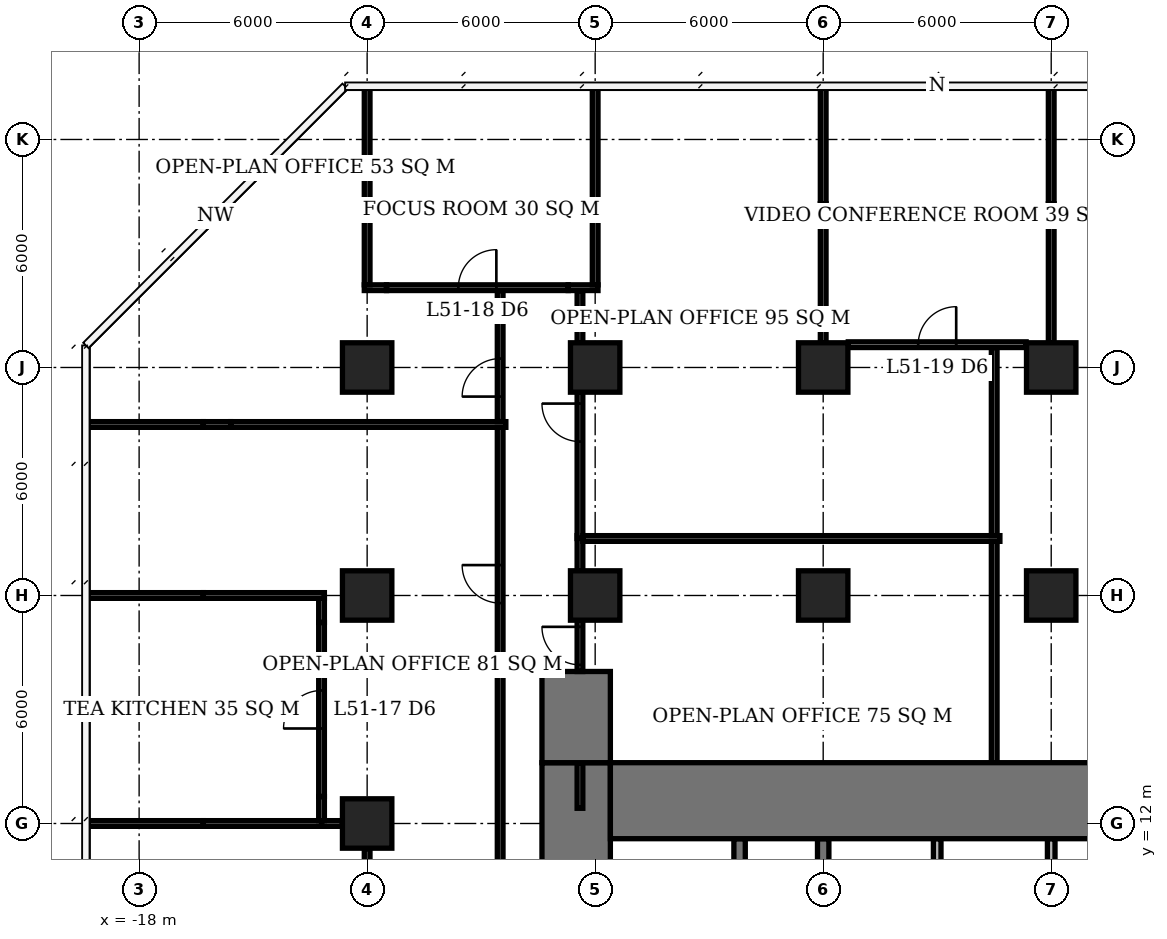
"""IFC4 building model, lengths in metres.
Left out: names, types, materials, properties, quantities, classifications, styles, units other than length and angle.
Written with IfcOpenShell. Run it as: python <this file> out.ifc"""

import sys

from ifc_helpers import new_model, si_unit, direction, frame, frame_2d, origin, origin_2d, place, context, subcontext, project, spatial, rectangle, extrude, element, fill, save


model = new_model("IFC4")
c1 = context("Model", 3, precision=1e-05, world=origin(), true_north=direction((0.0, 1.0)))
c2 = subcontext(c1, "Body", "Model", "MODEL_VIEW")
j1 = project(units=[si_unit("LENGTHUNIT", "METRE"), si_unit("PLANEANGLEUNIT", "RADIAN")], contexts=[c1])
p1 = place(None, origin())
s1 = spatial("IfcSite", under=j1, at=p1, CompositionType="ELEMENT")
p2 = place(p1, origin())
s2 = spatial("IfcBuilding", under=s1, at=p2, CompositionType="ELEMENT")
p3 = place(p2, frame((0.0, 0.0, 208.4)))
s3 = spatial("IfcBuildingStorey", under=s2, at=p3, CompositionType="ELEMENT", Elevation=208.4)
for number, where, z_axis, x_axis in (
    (1, (-12.0, 12.0, 0.0), (0.0, 0.0, 1.0), (1.0, 0.0, 0.0)),
    (2, (-12.0, 18.0, 0.0), (0.0, 0.0, 1.0), (1.0, 0.0, 0.0)),
    (3, (-12.0, 24.0, 0.0), (0.0, 0.0, 1.0), (1.0, 0.0, 0.0)),
    (4, (-6.0, 18.0, 0.0), (0.0, 0.0, 1.0), (1.0, 0.0, 0.0)),
    (5, (-6.0, 24.0, 0.0), (0.0, 0.0, 1.0), (1.0, 0.0, 0.0)),
    (6, (0.0, 18.0, 0.0), (0.0, 0.0, 1.0), (1.0, 0.0, 0.0)),
    (7, (0.0, 24.0, 0.0), (0.0, 0.0, 1.0), (1.0, 0.0, 0.0)),
    (8, (6.0, 18.0, 0.0), (0.0, 0.0, 1.0), (1.0, 0.0, 0.0)),
    (9, (6.0, 24.0, 0.0), (0.0, 0.0, 1.0), (1.0, 0.0, 0.0)),
):
    element("IfcColumn", number, at=place(p3, frame(where, z_axis=z_axis, x_axis=x_axis)), inside=s3, PredefinedType="COLUMN", context=c2, shape_type="SweptSolid", body=[
        extrude(rectangle(XDim=1.3, YDim=1.3, at=origin_2d()), origin(), (0.0, 0.0, 1.0), 3.9),
    ])
p4 = place(p3, frame((-5.6, 12.6, 0.0), z_axis=(0.0, 0.0, 1.0), x_axis=(1.0, 0.0, 0.0)))
e10 = element("IfcWall", 10, at=p4, inside=s3, PredefinedType="SHEAR", context=c2, shape_type="SweptSolid", body=[
    extrude(rectangle(XDim=23.2, YDim=2.0, at=frame_2d((11.6, 0.0))), origin(), (0.0, 0.0, 1.0), 3.9),
])
p5 = place(p3, frame((-6.5, -7.6, 0.0), z_axis=(0.0, 0.0, 1.0), x_axis=(0.0, 1.0, 0.0)))
e11 = element("IfcWall", 11, at=p5, inside=s3, PredefinedType="SHEAR", context=c2, shape_type="SweptSolid", body=[
    extrude(rectangle(XDim=21.2, YDim=1.8, at=frame_2d((10.6, 0.0))), origin(), (0.0, 0.0, 1.0), 3.9),
])
p6 = place(p5, frame((7.8, 0.0, 0.0)))
e12 = element("IfcOpeningElement", 12, at=p6, cuts=e11, PredefinedType="OPENING", context=c2, shape_type="SweptSolid", body=[
    extrude(rectangle(XDim=1.8, YDim=2.4, at=frame_2d((0.9, 1.2))), frame((0.0, 0.91, 0.0), z_axis=(0.0, -1.0, 0.0), x_axis=(1.0, 0.0, 0.0)), (0.0, 0.0, 1.0), 1.82),
])
p7 = place(p3, frame((-6.5, 13.6, 0.0), z_axis=(0.0, 0.0, 1.0), x_axis=(0.0, 1.0, 0.0)))
e13 = element("IfcWall", 13, at=p7, inside=s3, PredefinedType="SHEAR", context=c2, shape_type="SweptSolid", body=[
    extrude(rectangle(XDim=2.4, YDim=1.8, at=frame_2d((1.2, 0.0))), origin(), (0.0, 0.0, 1.0), 3.9),
])
for number, where, z_axis, x_axis in (
    (14, (0.0, 3.15, 0.0), (0.0, 0.0, 1.0), (0.0, 1.0, 0.0)),
    (15, (-2.2, 3.15, 0.0), (0.0, 0.0, 1.0), (0.0, 1.0, 0.0)),
):
    element("IfcWall", number, at=place(p3, frame(where, z_axis=z_axis, x_axis=x_axis)), inside=s3, PredefinedType="SHEAR", context=c2, shape_type="SweptSolid", body=[
        extrude(rectangle(XDim=8.45, YDim=0.3, at=frame_2d((4.225, 0.0))), origin(), (0.0, 0.0, 1.0), 3.9),
    ])
for number, where, z_axis, x_axis in (
    (16, (3.0, 6.15, 0.0), (0.0, 0.0, 1.0), (0.0, 1.0, 0.0)),
    (17, (6.0, 6.15, 0.0), (0.0, 0.0, 1.0), (0.0, 1.0, 0.0)),
):
    element("IfcWall", number, at=place(p3, frame(where, z_axis=z_axis, x_axis=x_axis)), inside=s3, PredefinedType="SOLIDWALL", context=c2, shape_type="SweptSolid", body=[
        extrude(rectangle(XDim=5.45, YDim=0.2, at=frame_2d((2.725, 0.0))), origin(), (0.0, 0.0, 1.0), 3.9),
    ])
p8 = place(p3, frame((-19.35, 12.0, 0.0), z_axis=(0.0, 0.0, 1.0), x_axis=(1.0, 0.0, 0.0)))
e18 = element("IfcWall", 18, at=p8, inside=s3, PredefinedType="PARTITIONING", context=c2, shape_type="SweptSolid", body=[
    extrude(rectangle(XDim=3.04, YDim=0.15, at=frame_2d((1.52, 0.0))), origin(), (0.0, 0.0, 1.0), 3.65),
])
p9 = place(p3, frame((-16.31, 12.0, 0.0), z_axis=(0.0, 0.0, 1.0), x_axis=(1.0, 0.0, 0.0)))
e19 = element("IfcWall", 19, at=p9, inside=s3, PredefinedType="PARTITIONING", context=c2, shape_type="SweptSolid", body=[
    extrude(rectangle(XDim=3.185, YDim=0.15, at=frame_2d((1.593, 0.0))), origin(), (0.0, 0.0, 1.0), 2.65),
])
p10 = place(p3, frame((-13.2, 12.0, 0.0), z_axis=(0.0, 0.0, 1.0), x_axis=(1.0, 0.0, 0.0)))
e20 = element("IfcWall", 20, at=p10, inside=s3, PredefinedType="PARTITIONING", context=c2, shape_type="SweptSolid", body=[
    extrude(rectangle(XDim=0.55, YDim=0.15, at=frame_2d((0.275, 0.0))), origin(), (0.0, 0.0, 1.0), 2.65),
])
p11 = place(p3, frame((-19.4, 18.0, 0.0), z_axis=(0.0, 0.0, 1.0), x_axis=(1.0, 0.0, 0.0)))
e21 = element("IfcWall", 21, at=p11, inside=s3, PredefinedType="PARTITIONING", context=c2, shape_type="SweptSolid", body=[
    extrude(rectangle(XDim=3.09, YDim=0.15, at=frame_2d((1.545, 0.0))), origin(), (0.0, 0.0, 1.0), 3.65),
])
p12 = place(p3, frame((-16.31, 18.0, 0.0), z_axis=(0.0, 0.0, 1.0), x_axis=(1.0, 0.0, 0.0)))
e22 = element("IfcWall", 22, at=p12, inside=s3, PredefinedType="PARTITIONING", context=c2, shape_type="SweptSolid", body=[
    extrude(rectangle(XDim=3.185, YDim=0.15, at=frame_2d((1.593, 0.0))), origin(), (0.0, 0.0, 1.0), 2.65),
])
p13 = place(p3, frame((0.66, 24.6, 0.0), z_axis=(0.0, 0.0, 1.0), x_axis=(1.0, 0.0, 0.0)))
e23 = element("IfcWall", 23, at=p13, inside=s3, PredefinedType="PARTITIONING", context=c2, shape_type="SweptSolid", body=[
    extrude(rectangle(XDim=4.68, YDim=0.15, at=frame_2d((2.34, 0.0))), origin(), (0.0, 0.0, 1.0), 3.65),
])
p14 = place(p13, frame((1.84, 0.0, 0.0)))
e24 = element("IfcOpeningElement", 24, at=p14, cuts=e23, PredefinedType="OPENING", context=c2, shape_type="SweptSolid", body=[
    extrude(rectangle(XDim=1.0, YDim=2.1, at=frame_2d((0.5, 1.05))), frame((0.0, 0.085, 0.0), z_axis=(0.0, -1.0, 0.0), x_axis=(1.0, 0.0, 0.0)), (0.0, 0.0, 1.0), 0.17),
])
p15 = place(p3, frame((-12.075, 26.1, 0.0), z_axis=(0.0, 0.0, 1.0), x_axis=(1.0, 0.0, 0.0)))
e25 = element("IfcWall", 25, at=p15, inside=s3, PredefinedType="PARTITIONING", context=c2, shape_type="SweptSolid", body=[
    extrude(rectangle(XDim=0.585, YDim=0.15, at=frame_2d((0.292, 0.0))), origin(), (0.0, 0.0, 1.0), 2.65),
])
p16 = place(p3, frame((-11.49, 26.1, 0.0), z_axis=(0.0, 0.0, 1.0), x_axis=(1.0, 0.0, 0.0)))
e26 = element("IfcWall", 26, at=p16, inside=s3, PredefinedType="PARTITIONING", context=c2, shape_type="SweptSolid", body=[
    extrude(rectangle(XDim=4.78, YDim=0.15, at=frame_2d((2.39, 0.0))), origin(), (0.0, 0.0, 1.0), 3.65),
])
p17 = place(p16, frame((1.89, 0.0, 0.0)))
e27 = element("IfcOpeningElement", 27, at=p17, cuts=e26, PredefinedType="OPENING", context=c2, shape_type="SweptSolid", body=[
    extrude(rectangle(XDim=1.0, YDim=2.1, at=frame_2d((0.5, 1.05))), frame((0.0, 0.085, 0.0), z_axis=(0.0, -1.0, 0.0), x_axis=(1.0, 0.0, 0.0)), (0.0, 0.0, 1.0), 0.17),
])
p18 = place(p3, frame((-6.71, 26.1, 0.0), z_axis=(0.0, 0.0, 1.0), x_axis=(1.0, 0.0, 0.0)))
e28 = element("IfcWall", 28, at=p18, inside=s3, PredefinedType="PARTITIONING", context=c2, shape_type="SweptSolid", body=[
    extrude(rectangle(XDim=0.785, YDim=0.15, at=frame_2d((0.393, 0.0))), origin(), (0.0, 0.0, 1.0), 2.65),
])
p19 = place(p3, frame((-13.2, 12.075, 0.0), z_axis=(0.0, 0.0, 1.0), x_axis=(0.0, 1.0, 0.0)))
e29 = element("IfcWall", 29, at=p19, inside=s3, PredefinedType="PARTITIONING", context=c2, shape_type="SweptSolid", body=[
    extrude(rectangle(XDim=0.635, YDim=0.15, at=frame_2d((0.317, 0.0))), origin(), (0.0, 0.0, 1.0), 2.65),
])
p20 = place(p3, frame((-13.2, 12.71, 0.0), z_axis=(0.0, 0.0, 1.0), x_axis=(0.0, 1.0, 0.0)))
e30 = element("IfcWall", 30, at=p20, inside=s3, PredefinedType="PARTITIONING", context=c2, shape_type="SweptSolid", body=[
    extrude(rectangle(XDim=4.58, YDim=0.15, at=frame_2d((2.29, 0.0))), origin(), (0.0, 0.0, 1.0), 3.65),
])
p21 = place(p20, frame((1.79, 0.0, 0.0)))
e31 = element("IfcOpeningElement", 31, at=p21, cuts=e30, PredefinedType="OPENING", context=c2, shape_type="SweptSolid", body=[
    extrude(rectangle(XDim=1.0, YDim=2.1, at=frame_2d((0.5, 1.05))), frame((0.0, 0.085, 0.0), z_axis=(0.0, -1.0, 0.0), x_axis=(1.0, 0.0, 0.0)), (0.0, 0.0, 1.0), 0.17),
])
p22 = place(p3, frame((-13.2, 17.29, 0.0), z_axis=(0.0, 0.0, 1.0), x_axis=(0.0, 1.0, 0.0)))
e32 = element("IfcWall", 32, at=p22, inside=s3, PredefinedType="PARTITIONING", context=c2, shape_type="SweptSolid", body=[
    extrude(rectangle(XDim=0.635, YDim=0.15, at=frame_2d((0.317, 0.0))), origin(), (0.0, 0.0, 1.0), 2.65),
])
p23 = place(p3, frame((-12.0, 9.075, 0.0), z_axis=(0.0, 0.0, 1.0), x_axis=(0.0, 1.0, 0.0)))
e33 = element("IfcWall", 33, at=p23, inside=s3, PredefinedType="PARTITIONING", context=c2, shape_type="SweptSolid", body=[
    extrude(rectangle(XDim=2.265, YDim=0.15, at=frame_2d((1.133, 0.0))), origin(), (0.0, 0.0, 1.0), 3.65),
])
p24 = place(p23, frame((0.325, 0.0, 0.0)))
e34 = element("IfcOpeningElement", 34, at=p24, cuts=e33, PredefinedType="OPENING", context=c2, shape_type="SweptSolid", body=[
    extrude(rectangle(XDim=1.0, YDim=2.1, at=frame_2d((0.5, 1.05))), frame((0.0, 0.085, 0.0), z_axis=(0.0, -1.0, 0.0), x_axis=(1.0, 0.0, 0.0)), (0.0, 0.0, 1.0), 0.17),
])
p25 = place(p3, frame((-12.0, 26.175, 0.0), z_axis=(0.0, 0.0, 1.0), x_axis=(0.0, 1.0, 0.0)))
e35 = element("IfcWall", 35, at=p25, inside=s3, PredefinedType="PARTITIONING", context=c2, shape_type="SweptSolid", body=[
    extrude(rectangle(XDim=2.135, YDim=0.15, at=frame_2d((1.067, 0.0))), origin(), (0.0, 0.0, 1.0), 2.65),
])
p26 = place(p3, frame((-12.0, 28.31, 0.0), z_axis=(0.0, 0.0, 1.0), x_axis=(0.0, 1.0, 0.0)))
e36 = element("IfcWall", 36, at=p26, inside=s3, PredefinedType="PARTITIONING", context=c2, shape_type="SweptSolid", body=[
    extrude(rectangle(XDim=3.09, YDim=0.15, at=frame_2d((1.545, 0.0))), origin(), (0.0, 0.0, 1.0), 3.65),
])
p27 = place(p3, frame((-6.0, 26.175, 0.0), z_axis=(0.0, 0.0, 1.0), x_axis=(0.0, 1.0, 0.0)))
e37 = element("IfcWall", 37, at=p27, inside=s3, PredefinedType="PARTITIONING", context=c2, shape_type="SweptSolid", body=[
    extrude(rectangle(XDim=2.135, YDim=0.15, at=frame_2d((1.067, 0.0))), origin(), (0.0, 0.0, 1.0), 2.65),
])
p28 = place(p3, frame((-6.0, 28.31, 0.0), z_axis=(0.0, 0.0, 1.0), x_axis=(0.0, 1.0, 0.0)))
e38 = element("IfcWall", 38, at=p28, inside=s3, PredefinedType="PARTITIONING", context=c2, shape_type="SweptSolid", body=[
    extrude(rectangle(XDim=3.09, YDim=0.15, at=frame_2d((1.545, 0.0))), origin(), (0.0, 0.0, 1.0), 3.65),
])
p29 = place(p3, frame((0.0, 24.65, 0.0), z_axis=(0.0, 0.0, 1.0), x_axis=(0.0, 1.0, 0.0)))
e39 = element("IfcWall", 39, at=p29, inside=s3, PredefinedType="PARTITIONING", context=c2, shape_type="SweptSolid", body=[
    extrude(rectangle(XDim=3.66, YDim=0.15, at=frame_2d((1.83, 0.0))), origin(), (0.0, 0.0, 1.0), 2.65),
])
p30 = place(p3, frame((0.0, 28.31, 0.0), z_axis=(0.0, 0.0, 1.0), x_axis=(0.0, 1.0, 0.0)))
e40 = element("IfcWall", 40, at=p30, inside=s3, PredefinedType="PARTITIONING", context=c2, shape_type="SweptSolid", body=[
    extrude(rectangle(XDim=3.04, YDim=0.15, at=frame_2d((1.52, 0.0))), origin(), (0.0, 0.0, 1.0), 3.65),
])
p31 = place(p3, frame((6.0, 24.65, 0.0), z_axis=(0.0, 0.0, 1.0), x_axis=(0.0, 1.0, 0.0)))
e41 = element("IfcWall", 41, at=p31, inside=s3, PredefinedType="PARTITIONING", context=c2, shape_type="SweptSolid", body=[
    extrude(rectangle(XDim=3.66, YDim=0.15, at=frame_2d((1.83, 0.0))), origin(), (0.0, 0.0, 1.0), 2.65),
])
p32 = place(p3, frame((6.0, 28.31, 0.0), z_axis=(0.0, 0.0, 1.0), x_axis=(0.0, 1.0, 0.0)))
e42 = element("IfcWall", 42, at=p32, inside=s3, PredefinedType="PARTITIONING", context=c2, shape_type="SweptSolid", body=[
    extrude(rectangle(XDim=3.04, YDim=0.15, at=frame_2d((1.52, 0.0))), origin(), (0.0, 0.0, 1.0), 3.65),
])
p33 = place(p3, frame((-19.4, 22.5, 0.0), z_axis=(0.0, 0.0, 1.0), x_axis=(1.0, 0.0, 0.0)))
e43 = element("IfcWall", 43, at=p33, inside=s3, PredefinedType="PARTITIONING", context=c2, shape_type="SweptSolid", body=[
    extrude(rectangle(XDim=3.09, YDim=0.15, at=frame_2d((1.545, 0.0))), origin(), (0.0, 0.0, 1.0), 3.65),
])
p34 = place(p3, frame((-16.31, 22.5, 0.0), z_axis=(0.0, 0.0, 1.0), x_axis=(1.0, 0.0, 0.0)))
e44 = element("IfcWall", 44, at=p34, inside=s3, PredefinedType="PARTITIONING", context=c2, shape_type="SweptSolid", body=[
    extrude(rectangle(XDim=0.72, YDim=0.15, at=frame_2d((0.36, 0.0))), origin(), (0.0, 0.0, 1.0), 2.65),
])
p35 = place(p3, frame((-15.59, 22.5, 0.0), z_axis=(0.0, 0.0, 1.0), x_axis=(1.0, 0.0, 0.0)))
e45 = element("IfcWall", 45, at=p35, inside=s3, PredefinedType="PARTITIONING", context=c2, shape_type="SweptSolid", body=[
    extrude(rectangle(XDim=7.24, YDim=0.15, at=frame_2d((3.62, 0.0))), origin(), (0.0, 0.0, 1.0), 3.65),
])
p36 = place(p3, frame((-8.5, 10.575, 0.0), z_axis=(0.0, 0.0, 1.0), x_axis=(0.0, 1.0, 0.0)))
e46 = element("IfcWall", 46, at=p36, inside=s3, PredefinedType="PARTITIONING", context=c2, shape_type="SweptSolid", body=[
    extrude(rectangle(XDim=11.85, YDim=0.15, at=frame_2d((5.925, 0.0))), origin(), (0.0, 0.0, 1.0), 3.65),
])
p37 = place(p36, frame((7.225, 0.0, 0.0)))
e47 = element("IfcOpeningElement", 47, at=p37, cuts=e46, PredefinedType="OPENING", context=c2, shape_type="SweptSolid", body=[
    extrude(rectangle(XDim=1.0, YDim=2.1, at=frame_2d((0.5, 1.05))), frame((0.0, 0.085, 0.0), z_axis=(0.0, -1.0, 0.0), x_axis=(1.0, 0.0, 0.0)), (0.0, 0.0, 1.0), 0.17),
])
p38 = place(p3, frame((-8.5, 22.575, 0.0), z_axis=(0.0, 0.0, 1.0), x_axis=(0.0, 1.0, 0.0)))
e48 = element("IfcWall", 48, at=p38, inside=s3, PredefinedType="PARTITIONING", context=c2, shape_type="SweptSolid", body=[
    extrude(rectangle(XDim=3.45, YDim=0.15, at=frame_2d((1.725, 0.0))), origin(), (0.0, 0.0, 1.0), 3.65),
])
p39 = place(p38, frame((0.659, 0.0, 0.0)))
e49 = element("IfcOpeningElement", 49, at=p39, cuts=e48, PredefinedType="OPENING", context=c2, shape_type="SweptSolid", body=[
    extrude(rectangle(XDim=1.0, YDim=2.1, at=frame_2d((0.5, 1.05))), frame((0.0, 0.085, 0.0), z_axis=(0.0, -1.0, 0.0), x_axis=(1.0, 0.0, 0.0)), (0.0, 0.0, 1.0), 0.17),
])
p40 = place(p3, frame((-6.4, 12.4, 0.0), z_axis=(0.0, 0.0, 1.0), x_axis=(0.0, 1.0, 0.0)))
e50 = element("IfcWall", 50, at=p40, inside=s3, PredefinedType="PARTITIONING", context=c2, shape_type="SweptSolid", body=[
    extrude(rectangle(XDim=1.2, YDim=0.15, at=frame_2d((0.6, 0.0))), origin(), (0.0, 0.0, 1.0), 3.65),
])
p41 = place(p3, frame((-6.4, 16.0, 0.0), z_axis=(0.0, 0.0, 1.0), x_axis=(0.0, 1.0, 0.0)))
e51 = element("IfcWall", 51, at=p41, inside=s3, PredefinedType="PARTITIONING", context=c2, shape_type="SweptSolid", body=[
    extrude(rectangle(XDim=1.35, YDim=0.15, at=frame_2d((0.675, 0.0))), origin(), (0.0, 0.0, 1.0), 3.65),
])
p42 = place(p41, frame((0.175, 0.0, 0.0)))
e52 = element("IfcOpeningElement", 52, at=p42, cuts=e51, PredefinedType="OPENING", context=c2, shape_type="SweptSolid", body=[
    extrude(rectangle(XDim=1.0, YDim=2.1, at=frame_2d((0.5, 1.05))), frame((0.0, 0.085, 0.0), z_axis=(0.0, -1.0, 0.0), x_axis=(1.0, 0.0, 0.0)), (0.0, 0.0, 1.0), 0.17),
])
p43 = place(p3, frame((-6.4, 18.65, 0.0), z_axis=(0.0, 0.0, 1.0), x_axis=(0.0, 1.0, 0.0)))
e53 = element("IfcWall", 53, at=p43, inside=s3, PredefinedType="PARTITIONING", context=c2, shape_type="SweptSolid", body=[
    extrude(rectangle(XDim=0.925, YDim=0.15, at=frame_2d((0.462, 0.0))), origin(), (0.0, 0.0, 1.0), 3.65),
])
p44 = place(p3, frame((-6.4, 19.5, 0.0), z_axis=(0.0, 0.0, 1.0), x_axis=(0.0, 1.0, 0.0)))
e54 = element("IfcWall", 54, at=p44, inside=s3, PredefinedType="PARTITIONING", context=c2, shape_type="SweptSolid", body=[
    extrude(rectangle(XDim=3.85, YDim=0.15, at=frame_2d((1.925, 0.0))), origin(), (0.0, 0.0, 1.0), 3.65),
])
p45 = place(p44, frame((2.55, 0.0, 0.0)))
e55 = element("IfcOpeningElement", 55, at=p45, cuts=e54, PredefinedType="OPENING", context=c2, shape_type="SweptSolid", body=[
    extrude(rectangle(XDim=1.0, YDim=2.1, at=frame_2d((0.5, 1.05))), frame((0.0, 0.085, 0.0), z_axis=(0.0, -1.0, 0.0), x_axis=(1.0, 0.0, 0.0)), (0.0, 0.0, 1.0), 0.17),
])
p46 = place(p3, frame((-6.4, 24.65, 0.0), z_axis=(0.0, 0.0, 1.0), x_axis=(0.0, 1.0, 0.0)))
e56 = element("IfcWall", 56, at=p46, inside=s3, PredefinedType="PARTITIONING", context=c2, shape_type="SweptSolid", body=[
    extrude(rectangle(XDim=1.375, YDim=0.15, at=frame_2d((0.688, 0.0))), origin(), (0.0, 0.0, 1.0), 2.65),
])
p47 = place(p3, frame((-6.325, 19.5, 0.0), z_axis=(0.0, 0.0, 1.0), x_axis=(1.0, 0.0, 0.0)))
e57 = element("IfcWall", 57, at=p47, inside=s3, PredefinedType="PARTITIONING", context=c2, shape_type="SweptSolid", body=[
    extrude(rectangle(XDim=10.975, YDim=0.15, at=frame_2d((5.487, 0.0))), origin(), (0.0, 0.0, 1.0), 3.65),
])
p48 = place(p3, frame((4.5, 12.4, 0.0), z_axis=(0.0, 0.0, 1.0), x_axis=(0.0, 1.0, 0.0)))
e58 = element("IfcWall", 58, at=p48, inside=s3, PredefinedType="PARTITIONING", context=c2, shape_type="SweptSolid", body=[
    extrude(rectangle(XDim=7.025, YDim=0.15, at=frame_2d((3.513, 0.0))), origin(), (0.0, 0.0, 1.0), 3.65),
])
p49 = place(p3, frame((4.5, 19.575, 0.0), z_axis=(0.0, 0.0, 1.0), x_axis=(0.0, 1.0, 0.0)))
e59 = element("IfcWall", 59, at=p49, inside=s3, PredefinedType="PARTITIONING", context=c2, shape_type="SweptSolid", body=[
    extrude(rectangle(XDim=4.95, YDim=0.15, at=frame_2d((2.475, 0.0))), origin(), (0.0, 0.0, 1.0), 3.65),
])
p50 = place(p21, origin())
e60 = element("IfcDoor", 60, at=p50, inside=s3, OperationType="SINGLE_SWING_LEFT", PredefinedType="DOOR", context=c2, shape_type="SweptSolid", body=[
    extrude(rectangle(XDim=1.0, YDim=2.1, at=frame_2d((0.5, 1.05))), frame((0.0, 0.025, 0.0), z_axis=(0.0, -1.0, 0.0), x_axis=(1.0, 0.0, 0.0)), (0.0, 0.0, 1.0), 0.05),
])
fill(e31, e60)
p51 = place(p17, origin())
e61 = element("IfcDoor", 61, at=p51, inside=s3, OperationType="SINGLE_SWING_RIGHT", PredefinedType="DOOR", context=c2, shape_type="SweptSolid", body=[
    extrude(rectangle(XDim=1.0, YDim=2.1, at=frame_2d((0.5, 1.05))), frame((0.0, 0.025, 0.0), z_axis=(0.0, -1.0, 0.0), x_axis=(1.0, 0.0, 0.0)), (0.0, 0.0, 1.0), 0.05),
])
fill(e27, e61)
p52 = place(p14, origin())
e62 = element("IfcDoor", 62, at=p52, inside=s3, OperationType="SINGLE_SWING_RIGHT", PredefinedType="DOOR", context=c2, shape_type="SweptSolid", body=[
    extrude(rectangle(XDim=1.0, YDim=2.1, at=frame_2d((0.5, 1.05))), frame((0.0, 0.025, 0.0), z_axis=(0.0, -1.0, 0.0), x_axis=(1.0, 0.0, 0.0)), (0.0, 0.0, 1.0), 0.05),
])
fill(e24, e62)
p53 = place(p37, origin())
e63 = element("IfcDoor", 63, at=p53, inside=s3, OperationType="SINGLE_SWING_RIGHT", PredefinedType="DOOR", context=c2, shape_type="SweptSolid", body=[
    extrude(rectangle(XDim=1.0, YDim=2.1, at=frame_2d((0.5, 1.05))), frame((0.0, 0.025, 0.0), z_axis=(0.0, -1.0, 0.0), x_axis=(1.0, 0.0, 0.0)), (0.0, 0.0, 1.0), 0.05),
])
fill(e47, e63)
p54 = place(p45, origin())
e64 = element("IfcDoor", 64, at=p54, inside=s3, OperationType="SINGLE_SWING_RIGHT", PredefinedType="DOOR", context=c2, shape_type="SweptSolid", body=[
    extrude(rectangle(XDim=1.0, YDim=2.1, at=frame_2d((0.5, 1.05))), frame((0.0, 0.025, 0.0), z_axis=(0.0, -1.0, 0.0), x_axis=(1.0, 0.0, 0.0)), (0.0, 0.0, 1.0), 0.05),
])
fill(e55, e64)
p55 = place(p39, origin())
e65 = element("IfcDoor", 65, at=p55, inside=s3, OperationType="SINGLE_SWING_LEFT", PredefinedType="DOOR", context=c2, shape_type="SweptSolid", body=[
    extrude(rectangle(XDim=1.0, YDim=2.1, at=frame_2d((0.5, 1.05))), frame((0.0, 0.025, 0.0), z_axis=(0.0, -1.0, 0.0), x_axis=(1.0, 0.0, 0.0)), (0.0, 0.0, 1.0), 0.05),
])
fill(e49, e65)
p56 = place(p42, origin())
e66 = element("IfcDoor", 66, at=p56, inside=s3, OperationType="SINGLE_SWING_RIGHT", PredefinedType="DOOR", context=c2, shape_type="SweptSolid", body=[
    extrude(rectangle(XDim=1.0, YDim=2.1, at=frame_2d((0.5, 1.05))), frame((0.0, 0.025, 0.0), z_axis=(0.0, -1.0, 0.0), x_axis=(1.0, 0.0, 0.0)), (0.0, 0.0, 1.0), 0.05),
])
fill(e52, e66)
save(model, sys.argv[1])
